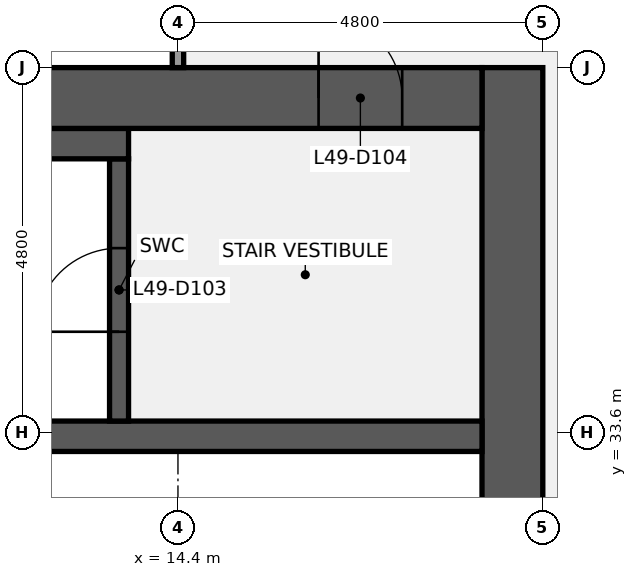
"""IFC4 building model, lengths in metres.
Left out: names, types, materials, properties, quantities, classifications, styles, units other than length and angle.
Written with IfcOpenShell. Run it as: python <this file> out.ifc"""

import sys

from ifc_helpers import new_model, si_unit, direction, frame, frame_2d, origin, place, context, subcontext, project, spatial, rectangle, extrude, element, fill, save


model = new_model("IFC4")
c1 = context("Model", 3, precision=1e-05, world=origin(), true_north=direction((0.0, 1.0)))
c2 = subcontext(c1, "Body", "Model", "MODEL_VIEW")
j1 = project(units=[si_unit("LENGTHUNIT", "METRE"), si_unit("PLANEANGLEUNIT", "RADIAN")], contexts=[c1])
p1 = place(None, origin())
s1 = spatial("IfcSite", under=j1, at=p1, CompositionType="ELEMENT")
p2 = place(p1, origin())
s2 = spatial("IfcBuilding", under=s1, at=p2, CompositionType="ELEMENT")
p3 = place(p2, frame((0.0, 0.0, 225.2)))
s3 = spatial("IfcBuildingStorey", under=s2, at=p3, CompositionType="ELEMENT", Elevation=225.2)
p4 = place(p3, frame((18.8, 38.4, 0.0), z_axis=(0.0, 0.0, 1.0), x_axis=(0.0, -1.0, 0.0)))
e1 = element("IfcWall", 1, at=p4, inside=s3, PredefinedType="SHEAR", context=c2, shape_type="SweptSolid", body=[
    extrude(rectangle(XDim=28.8, YDim=0.8, at=frame_2d((14.4, 0.0))), origin(), (0.0, 0.0, 1.0), 3.84),
])
p5 = place(p4, frame((18.3, 0.0, 0.0)))
e2 = element("IfcOpeningElement", 2, at=p5, cuts=e1, PredefinedType="OPENING", context=c2, shape_type="SweptSolid", body=[
    extrude(rectangle(XDim=1.8, YDim=2.1, at=frame_2d((0.9, 1.05))), frame((0.0, 0.41, 0.0), z_axis=(0.0, -1.0, 0.0), x_axis=(1.0, 0.0, 0.0)), (0.0, 0.0, 1.0), 0.82),
])
p6 = place(p4, frame((8.7, 0.0, 0.0)))
e3 = element("IfcOpeningElement", 3, at=p6, cuts=e1, PredefinedType="OPENING", context=c2, shape_type="SweptSolid", body=[
    extrude(rectangle(XDim=1.8, YDim=2.1, at=frame_2d((0.9, 1.05))), frame((0.0, 0.41, 0.0), z_axis=(0.0, -1.0, 0.0), x_axis=(1.0, 0.0, 0.0)), (0.0, 0.0, 1.0), 0.82),
])
p7 = place(p3, frame((0.8, 33.55, 0.0), z_axis=(0.0, 0.0, 1.0), x_axis=(1.0, 0.0, 0.0)))
e4 = element("IfcWall", 4, at=p7, inside=s3, PredefinedType="SHEAR", context=c2, shape_type="SweptSolid", body=[
    extrude(rectangle(XDim=17.6, YDim=0.4, at=frame_2d((8.8, 0.0))), origin(), (0.0, 0.0, 1.0), 3.84),
])
p8 = place(p3, frame((13.625, 33.75, 0.0), z_axis=(0.0, 0.0, 1.0), x_axis=(0.0, 1.0, 0.0)))
e5 = element("IfcWall", 5, at=p8, inside=s3, PredefinedType="SHEAR", context=c2, shape_type="SweptSolid", body=[
    extrude(rectangle(XDim=3.45, YDim=0.25, at=frame_2d((1.725, 0.0))), origin(), (0.0, 0.0, 1.0), 3.84),
])
p9 = place(p8, frame((1.175, 0.0, 0.0)))
e6 = element("IfcOpeningElement", 6, at=p9, cuts=e5, PredefinedType="OPENING", context=c2, shape_type="SweptSolid", body=[
    extrude(rectangle(XDim=1.1, YDim=2.1, at=frame_2d((0.55, 1.05))), frame((0.0, 0.135, 0.0), z_axis=(0.0, -1.0, 0.0), x_axis=(1.0, 0.0, 0.0)), (0.0, 0.0, 1.0), 0.27),
])
p10 = place(p3, frame((9.6, 37.4, 0.0), z_axis=(0.0, 0.0, 1.0), x_axis=(1.0, 0.0, 0.0)))
e7 = element("IfcWall", 7, at=p10, inside=s3, PredefinedType="SHEAR", context=c2, shape_type="SweptSolid", body=[
    extrude(rectangle(XDim=4.15, YDim=0.4, at=frame_2d((2.075, 0.0))), origin(), (0.0, 0.0, 1.0), 3.84),
])
p11 = place(p3, frame((9.6, 38.0, 0.0), z_axis=(0.0, 0.0, 1.0), x_axis=(1.0, 0.0, 0.0)))
e8 = element("IfcWall", 8, at=p11, inside=s3, PredefinedType="SHEAR", context=c2, shape_type="SweptSolid", body=[
    extrude(rectangle(XDim=8.8, YDim=0.8, at=frame_2d((4.4, 0.0))), origin(), (0.0, 0.0, 1.0), 3.84),
])
p12 = place(p11, frame((6.65, 0.0, 0.0)))
e9 = element("IfcOpeningElement", 9, at=p12, cuts=e8, PredefinedType="OPENING", context=c2, shape_type="SweptSolid", body=[
    extrude(rectangle(XDim=1.1, YDim=2.1, at=frame_2d((0.55, 1.05))), frame((0.0, 0.41, 0.0), z_axis=(0.0, -1.0, 0.0), x_axis=(1.0, 0.0, 0.0)), (0.0, 0.0, 1.0), 0.82),
])
p13 = place(p3, frame((14.4, 38.4, 0.0), z_axis=(0.0, 0.0, 1.0), x_axis=(0.0, 1.0, 0.0)))
e10 = element("IfcWall", 10, at=p13, inside=s3, PredefinedType="PARTITIONING", context=c2, shape_type="SweptSolid", body=[
    extrude(rectangle(XDim=2.325, YDim=0.15, at=frame_2d((1.163, 0.0))), origin(), (0.0, 0.0, 1.0), 2.87),
])
p14 = place(p13, frame((0.663, 0.0, 0.0)))
e11 = element("IfcOpeningElement", 11, at=p14, cuts=e10, PredefinedType="OPENING", context=c2, shape_type="SweptSolid", body=[
    extrude(rectangle(XDim=1.0, YDim=2.1, at=frame_2d((0.5, 1.05))), frame((0.0, 0.085, 0.0), z_axis=(0.0, -1.0, 0.0), x_axis=(1.0, 0.0, 0.0)), (0.0, 0.0, 1.0), 0.17),
])
p15 = place(p9, origin())
e12 = element("IfcDoor", 12, at=p15, inside=s3, OperationType="SINGLE_SWING_LEFT", PredefinedType="DOOR", context=c2, shape_type="SweptSolid", body=[
    extrude(rectangle(XDim=1.1, YDim=2.1, at=frame_2d((0.55, 1.05))), frame((0.0, 0.025, 0.0), z_axis=(0.0, -1.0, 0.0), x_axis=(1.0, 0.0, 0.0)), (0.0, 0.0, 1.0), 0.05),
])
fill(e6, e12)
p16 = place(p12, origin())
e13 = element("IfcDoor", 13, at=p16, inside=s3, OperationType="SINGLE_SWING_LEFT", PredefinedType="DOOR", context=c2, shape_type="SweptSolid", body=[
    extrude(rectangle(XDim=1.1, YDim=2.1, at=frame_2d((0.55, 1.05))), frame((0.0, 0.025, 0.0), z_axis=(0.0, -1.0, 0.0), x_axis=(1.0, 0.0, 0.0)), (0.0, 0.0, 1.0), 0.05),
])
fill(e9, e13)
save(model, sys.argv[1])
